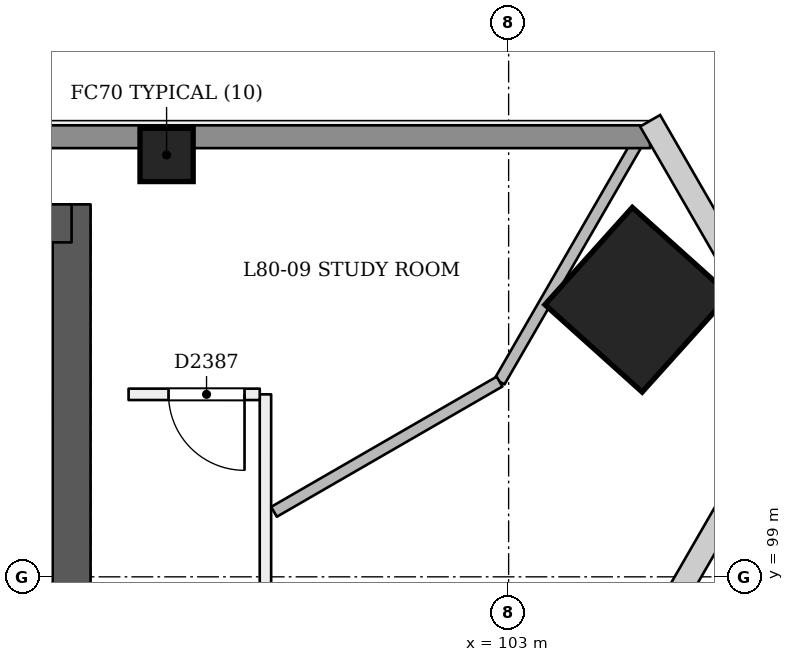
"""IFC4 building model, lengths in metres.
Left out: names, types, materials, properties, quantities, classifications, styles, units other than length and angle.
Written with IfcOpenShell. Run it as: python <this file> out.ifc"""

import sys

from ifc_helpers import new_model, si_unit, direction, frame, frame_2d, origin, origin_2d, place, context, subcontext, project, spatial, rectangle, extrude, element, fill, save


model = new_model("IFC4")
c1 = context("Model", 3, precision=1e-05, world=origin(), true_north=direction((0.0, 1.0)))
c2 = subcontext(c1, "Body", "Model", "MODEL_VIEW")
j1 = project(units=[si_unit("LENGTHUNIT", "METRE"), si_unit("PLANEANGLEUNIT", "RADIAN")], contexts=[c1])
p1 = place(None, origin())
s1 = spatial("IfcSite", under=j1, at=p1, CompositionType="ELEMENT")
p2 = place(p1, origin())
s2 = spatial("IfcBuilding", under=s1, at=p2, CompositionType="ELEMENT")
p3 = place(p2, frame((0.0, 0.0, 309.4)))
s3 = spatial("IfcBuildingStorey", under=s2, at=p3, CompositionType="ELEMENT", Elevation=309.4)
p4 = place(p3, frame((97.25, 93.15, 0.0), z_axis=(0.0, 0.0, 1.0), x_axis=(0.0, 1.0, 0.0)))
e1 = element("IfcWall", 1, at=p4, inside=s3, PredefinedType="SHEAR", context=c2, shape_type="SweptSolid", body=[
    extrude(rectangle(XDim=10.75, YDim=0.5, at=frame_2d((5.375, 0.0))), origin(), (0.0, 0.0, 1.0), 3.6),
])
p5 = place(p3, frame((97.25, 103.65, 0.0), z_axis=(0.0, 0.0, 1.0), x_axis=(-1.0, 0.0, 0.0)))
e2 = element("IfcWall", 2, at=p5, inside=s3, PredefinedType="SHEAR", context=c2, shape_type="SweptSolid", body=[
    extrude(rectangle(XDim=24.75, YDim=0.5, at=frame_2d((12.375, 0.0))), origin(), (0.0, 0.0, 1.0), 3.6),
])
p6 = place(p3, frame((104.726, 102.634, 0.0), z_axis=(-0.028334066552, 0.009286524205, 0.999555371723), x_axis=(0.498275434767, -0.866735122385, 0.022176986539)))
e3 = element("IfcColumn", 3, at=p6, inside=s3, PredefinedType="COLUMN", context=c2, shape_type="SweptSolid", body=[
    extrude(rectangle(XDim=1.72, YDim=1.72, at=origin_2d()), origin(), (0.0, 0.0, 1.0), 3.602),
])
p7 = place(p3, frame((98.5, 104.55, 0.0), z_axis=(0.0, 0.0, 1.0), x_axis=(1.0, 0.0, 0.0)))
e4 = element("IfcColumn", 4, at=p7, inside=s3, PredefinedType="COLUMN", context=c2, shape_type="SweptSolid", body=[
    extrude(rectangle(XDim=0.7, YDim=0.7, at=origin_2d()), origin(), (0.0, 0.0, 1.0), 3.6),
])
p8 = place(p3, frame((99.8, 91.188, 0.0), z_axis=(0.0, 0.0, 1.0), x_axis=(4.7809146e-05, 0.999999998857, 0.0)))
e5 = element("IfcWall", 5, at=p8, inside=s3, PredefinedType="PARTITIONING", context=c2, shape_type="SweptSolid", body=[
    extrude(rectangle(XDim=10.213, YDim=0.15, at=frame_2d((5.106, 0.0))), origin(), (0.0, 0.0, 1.0), 3.2),
])
p9 = place(p3, frame((99.726, 101.401, 0.0), z_axis=(0.0, 0.0, 1.0), x_axis=(-1.0, 0.0, 0.0)))
e6 = element("IfcWall", 6, at=p9, inside=s3, PredefinedType="PARTITIONING", context=c2, shape_type="SweptSolid", body=[
    extrude(rectangle(XDim=1.726, YDim=0.15, at=frame_2d((0.863, 0.0))), origin(), (0.0, 0.0, 1.0), 3.2),
])
p10 = place(p9, frame((0.2, 0.0, 0.0)))
e7 = element("IfcOpeningElement", 7, at=p10, cuts=e6, PredefinedType="OPENING", context=c2, shape_type="SweptSolid", body=[
    extrude(rectangle(XDim=1.0, YDim=2.1, at=frame_2d((0.5, 1.05))), frame((0.0, 0.085, 0.0), z_axis=(0.0, -1.0, 0.0), x_axis=(1.0, 0.0, 0.0)), (0.0, 0.0, 1.0), 0.171),
])
p11 = place(p3, frame((104.804, 104.9, 0.0), z_axis=(0.0, 0.0, 1.0), x_axis=(-0.500002645523, -0.866023876385, 0.0)))
e8 = element("IfcWall", 8, at=p11, inside=s3, PredefinedType="PARTITIONING", context=c2, shape_type="SweptSolid", body=[
    extrude(rectangle(XDim=3.847, YDim=0.15, at=frame_2d((1.923, 0.0))), origin(), (0.0, 0.0, 1.0), 2.7),
])
p12 = place(p3, frame((102.88, 101.569, 0.0), z_axis=(0.0, 0.0, 1.0), x_axis=(-0.86602895729, -0.499993845097, 0.0)))
e9 = element("IfcWall", 9, at=p12, inside=s3, PredefinedType="PARTITIONING", context=c2, shape_type="SweptSolid", body=[
    extrude(rectangle(XDim=3.426, YDim=0.15, at=frame_2d((1.713, 0.0))), origin(), (0.0, 0.0, 1.0), 3.2),
])
p13 = place(p3, frame((65.138, 104.79, 0.0), z_axis=(0.0, 0.0, 1.0), x_axis=(1.0, 0.0, 0.0)))
e10 = element("IfcWall", 10, at=p13, inside=s3, PredefinedType="SOLIDWALL", context=c2, shape_type="SweptSolid", body=[
    extrude(rectangle(XDim=39.723, YDim=0.3, at=frame_2d((19.862, 0.0))), origin(), (0.0, 0.0, 1.0), 2.7),
])
p14 = place(p10, origin())
e11 = element("IfcDoor", 11, at=p14, inside=s3, OperationType="SINGLE_SWING_LEFT", PredefinedType="NOTDEFINED", context=c2, shape_type="SweptSolid", body=[
    extrude(rectangle(XDim=1.0, YDim=2.1, at=frame_2d((0.5, 1.05))), frame((0.0, 0.025, 0.0), z_axis=(0.0, -1.0, 0.0), x_axis=(1.0, 0.0, 0.0)), (0.0, 0.0, 1.0), 0.05),
])
fill(e7, e11)
save(model, sys.argv[1])
